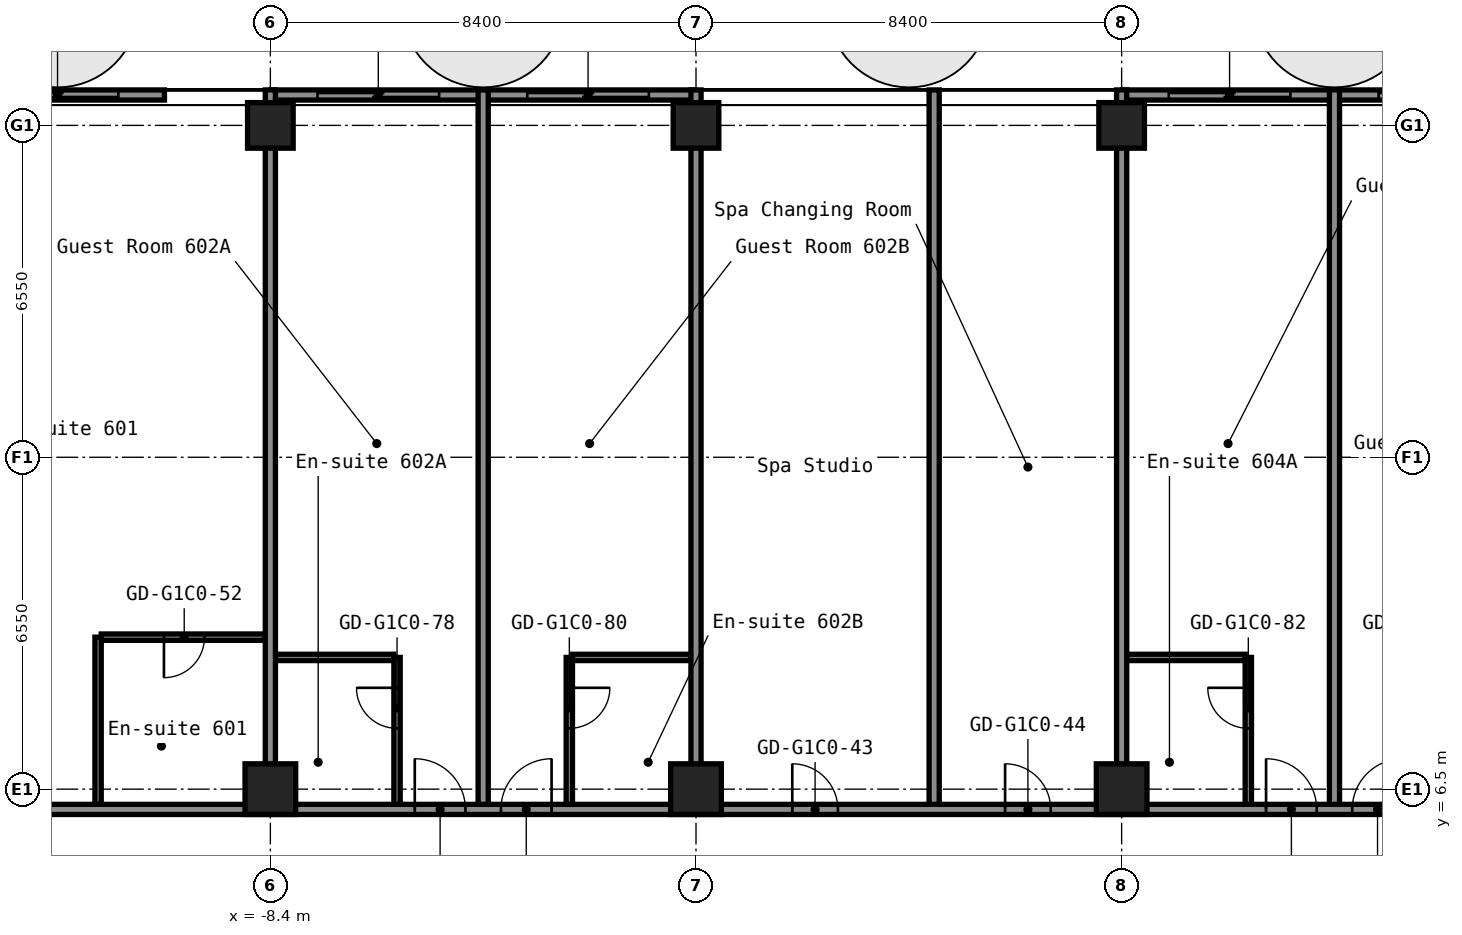
"""IFC4 building model, lengths in metres.
Left out: names, types, materials, properties, quantities, classifications, styles, units other than length and angle.
Written with IfcOpenShell. Run it as: python <this file> out.ifc"""

import sys

from ifc_helpers import new_model, si_unit, direction, frame, frame_2d, origin, origin_2d, place, context, subcontext, project, spatial, rectangle, hollow_rectangle, extrude, element, fill, save


model = new_model("IFC4")
c1 = context("Model", 3, precision=1e-05, world=origin(), true_north=direction((0.0, 1.0)))
c2 = subcontext(c1, "Body", "Model", "MODEL_VIEW")
j1 = project(units=[si_unit("LENGTHUNIT", "METRE"), si_unit("PLANEANGLEUNIT", "RADIAN")], contexts=[c1])
p1 = place(None, origin())
s1 = spatial("IfcSite", under=j1, at=p1, CompositionType="ELEMENT")
p2 = place(p1, origin())
s2 = spatial("IfcBuilding", under=s1, at=p2, CompositionType="ELEMENT")
p3 = place(p2, frame((0.0, 0.0, 26.2)))
s3 = spatial("IfcBuildingStorey", under=s2, at=p3, CompositionType="ELEMENT", Elevation=26.2)
p4 = place(p3, frame((-8.4, 6.5, 0.0), z_axis=(0.0, 0.0, 1.0), x_axis=(1.0, 0.0, 0.0)))
e1 = element("IfcColumn", 1, at=p4, inside=s3, PredefinedType="COLUMN", context=c2, shape_type="SweptSolid", body=[
    extrude(hollow_rectangle(XDim=1.0, YDim=1.0, WallThickness=0.04, at=origin_2d()), origin(), (0.0, 0.0, 1.0), 2.8),
])
p5 = place(p3, frame((-8.4, 19.6, 0.0), z_axis=(0.0, 0.0, 1.0), x_axis=(1.0, 0.0, 0.0)))
e2 = element("IfcColumn", 2, at=p5, inside=s3, PredefinedType="COLUMN", context=c2, shape_type="SweptSolid", body=[
    extrude(hollow_rectangle(XDim=0.9, YDim=0.9, WallThickness=0.036, at=origin_2d()), origin(), (0.0, 0.0, 1.0), 2.8),
])
p6 = place(p3, frame((0.0, 6.5, 0.0), z_axis=(0.0, 0.0, 1.0), x_axis=(1.0, 0.0, 0.0)))
e3 = element("IfcColumn", 3, at=p6, inside=s3, PredefinedType="COLUMN", context=c2, shape_type="SweptSolid", body=[
    extrude(hollow_rectangle(XDim=1.0, YDim=1.0, WallThickness=0.04, at=origin_2d()), origin(), (0.0, 0.0, 1.0), 2.8),
])
p7 = place(p3, frame((0.0, 19.6, 0.0), z_axis=(0.0, 0.0, 1.0), x_axis=(1.0, 0.0, 0.0)))
e4 = element("IfcColumn", 4, at=p7, inside=s3, PredefinedType="COLUMN", context=c2, shape_type="SweptSolid", body=[
    extrude(hollow_rectangle(XDim=0.9, YDim=0.9, WallThickness=0.036, at=origin_2d()), origin(), (0.0, 0.0, 1.0), 2.8),
])
p8 = place(p3, frame((8.4, 6.5, 0.0), z_axis=(0.0, 0.0, 1.0), x_axis=(1.0, 0.0, 0.0)))
e5 = element("IfcColumn", 5, at=p8, inside=s3, PredefinedType="COLUMN", context=c2, shape_type="SweptSolid", body=[
    extrude(hollow_rectangle(XDim=1.0, YDim=1.0, WallThickness=0.04, at=origin_2d()), origin(), (0.0, 0.0, 1.0), 2.8),
])
p9 = place(p3, frame((8.4, 19.6, 0.0), z_axis=(0.0, 0.0, 1.0), x_axis=(1.0, 0.0, 0.0)))
e6 = element("IfcColumn", 6, at=p9, inside=s3, PredefinedType="COLUMN", context=c2, shape_type="SweptSolid", body=[
    extrude(hollow_rectangle(XDim=0.9, YDim=0.9, WallThickness=0.036, at=origin_2d()), origin(), (0.0, 0.0, 1.0), 2.8),
])
p10 = place(p3, frame((-16.8, 6.1, 0.0), z_axis=(0.0, 0.0, 1.0), x_axis=(1.0, 0.0, 0.0)))
e7 = element("IfcWall", 7, at=p10, inside=s3, PredefinedType="PARTITIONING", context=c2, shape_type="SweptSolid", body=[
    extrude(rectangle(XDim=33.6, YDim=0.2, at=frame_2d((16.8, 0.0))), origin(), (0.0, 0.0, 1.0), 2.8),
])
p11 = place(p10, frame((2.0, 0.0, 0.0)))
e8 = element("IfcOpeningElement", 8, at=p11, cuts=e7, PredefinedType="OPENING", context=c2, shape_type="SweptSolid", body=[
    extrude(rectangle(XDim=1.0, YDim=2.1, at=frame_2d((0.5, 1.05))), frame((0.0, 0.11, 0.0), z_axis=(0.0, -1.0, 0.0), x_axis=(1.0, 0.0, 0.0)), (0.0, 0.0, 1.0), 0.22),
])
p12 = place(p10, frame((11.25, 0.0, 0.0)))
e9 = element("IfcOpeningElement", 9, at=p12, cuts=e7, PredefinedType="OPENING", context=c2, shape_type="SweptSolid", body=[
    extrude(rectangle(XDim=1.0, YDim=2.1, at=frame_2d((0.5, 1.05))), frame((0.0, 0.11, 0.0), z_axis=(0.0, -1.0, 0.0), x_axis=(1.0, 0.0, 0.0)), (0.0, 0.0, 1.0), 0.22),
])
p13 = place(p10, frame((12.95, 0.0, 0.0)))
e10 = element("IfcOpeningElement", 10, at=p13, cuts=e7, PredefinedType="OPENING", context=c2, shape_type="SweptSolid", body=[
    extrude(rectangle(XDim=1.0, YDim=2.1, at=frame_2d((0.5, 1.05))), frame((0.0, 0.11, 0.0), z_axis=(0.0, -1.0, 0.0), x_axis=(1.0, 0.0, 0.0)), (0.0, 0.0, 1.0), 0.22),
])
p14 = place(p10, frame((18.7, 0.0, 0.0)))
e11 = element("IfcOpeningElement", 11, at=p14, cuts=e7, PredefinedType="OPENING", context=c2, shape_type="SweptSolid", body=[
    extrude(rectangle(XDim=0.9, YDim=2.1, at=frame_2d((0.45, 1.05))), frame((0.0, 0.11, 0.0), z_axis=(0.0, -1.0, 0.0), x_axis=(1.0, 0.0, 0.0)), (0.0, 0.0, 1.0), 0.22),
])
p15 = place(p10, frame((22.9, 0.0, 0.0)))
e12 = element("IfcOpeningElement", 12, at=p15, cuts=e7, PredefinedType="OPENING", context=c2, shape_type="SweptSolid", body=[
    extrude(rectangle(XDim=0.9, YDim=2.1, at=frame_2d((0.45, 1.05))), frame((0.0, 0.11, 0.0), z_axis=(0.0, -1.0, 0.0), x_axis=(1.0, 0.0, 0.0)), (0.0, 0.0, 1.0), 0.22),
])
p16 = place(p10, frame((28.05, 0.0, 0.0)))
e13 = element("IfcOpeningElement", 13, at=p16, cuts=e7, PredefinedType="OPENING", context=c2, shape_type="SweptSolid", body=[
    extrude(rectangle(XDim=1.0, YDim=2.1, at=frame_2d((0.5, 1.05))), frame((0.0, 0.11, 0.0), z_axis=(0.0, -1.0, 0.0), x_axis=(1.0, 0.0, 0.0)), (0.0, 0.0, 1.0), 0.22),
])
p17 = place(p10, frame((29.75, 0.0, 0.0)))
e14 = element("IfcOpeningElement", 14, at=p17, cuts=e7, PredefinedType="OPENING", context=c2, shape_type="SweptSolid", body=[
    extrude(rectangle(XDim=1.0, YDim=2.1, at=frame_2d((0.5, 1.05))), frame((0.0, 0.11, 0.0), z_axis=(0.0, -1.0, 0.0), x_axis=(1.0, 0.0, 0.0)), (0.0, 0.0, 1.0), 0.22),
])
p18 = place(p3, frame((-8.3, 9.1, 0.0), z_axis=(0.0, 0.0, 1.0), x_axis=(1.0, 0.0, 0.0)))
e15 = element("IfcWall", 15, at=p18, inside=s3, PredefinedType="PARTITIONING", context=c2, shape_type="SweptSolid", body=[
    extrude(rectangle(XDim=2.338, YDim=0.125, at=frame_2d((1.169, 0.0))), origin(), (0.0, 0.0, 1.0), 2.8),
])
for number, where, z_axis, x_axis in (
    (16, (-2.438, 9.1, 0.0), (0.0, 0.0, 1.0), (1.0, 0.0, 0.0)),
    (17, (8.5, 9.1, 0.0), (0.0, 0.0, 1.0), (1.0, 0.0, 0.0)),
):
    element("IfcWall", number, at=place(p3, frame(where, z_axis=z_axis, x_axis=x_axis)), inside=s3, PredefinedType="PARTITIONING", context=c2, shape_type="SweptSolid", body=[
        extrude(rectangle(XDim=2.337, YDim=0.125, at=frame_2d((1.169, 0.0))), origin(), (0.0, 0.0, 1.0), 2.8),
    ])
p19 = place(p3, frame((-11.738, 9.5, 0.0), z_axis=(0.0, 0.0, 1.0), x_axis=(1.0, 0.0, 0.0)))
e18 = element("IfcWall", 18, at=p19, inside=s3, PredefinedType="PARTITIONING", context=c2, shape_type="SweptSolid", body=[
    extrude(rectangle(XDim=3.238, YDim=0.125, at=frame_2d((1.619, 0.0))), origin(), (0.0, 0.0, 1.0), 2.8),
])
p20 = place(p19, frame((1.238, 0.0, 0.0)))
e19 = element("IfcOpeningElement", 19, at=p20, cuts=e18, PredefinedType="OPENING", context=c2, shape_type="SweptSolid", body=[
    extrude(rectangle(XDim=0.8, YDim=2.1, at=frame_2d((0.4, 1.05))), frame((0.0, 0.073, 0.0), z_axis=(0.0, -1.0, 0.0), x_axis=(1.0, 0.0, 0.0)), (0.0, 0.0, 1.0), 0.145),
])
p21 = place(p3, frame((-11.8, 6.2, 0.0), z_axis=(0.0, 0.0, 1.0), x_axis=(0.0, 1.0, 0.0)))
e20 = element("IfcWall", 20, at=p21, inside=s3, PredefinedType="PARTITIONING", context=c2, shape_type="SweptSolid", body=[
    extrude(rectangle(XDim=3.3, YDim=0.125, at=frame_2d((1.65, 0.0))), origin(), (0.0, 0.0, 1.0), 2.8),
])
p22 = place(p3, frame((-8.4, 6.99, 0.0), z_axis=(0.0, 0.0, 1.0), x_axis=(0.0, 1.0, 0.0)))
e21 = element("IfcWall", 21, at=p22, inside=s3, PredefinedType="PARTITIONING", context=c2, shape_type="SweptSolid", body=[
    extrude(rectangle(XDim=13.31, YDim=0.2, at=frame_2d((6.655, 0.0))), origin(), (0.0, 0.0, 1.0), 2.8),
])
p23 = place(p3, frame((-5.9, 6.2, 0.0), z_axis=(0.0, 0.0, 1.0), x_axis=(0.0, 1.0, 0.0)))
e22 = element("IfcWall", 22, at=p23, inside=s3, PredefinedType="PARTITIONING", context=c2, shape_type="SweptSolid", body=[
    extrude(rectangle(XDim=2.9, YDim=0.125, at=frame_2d((1.45, 0.0))), origin(), (0.0, 0.0, 1.0), 2.8),
])
p24 = place(p23, frame((1.5, 0.0, 0.0)))
e23 = element("IfcOpeningElement", 23, at=p24, cuts=e22, PredefinedType="OPENING", context=c2, shape_type="SweptSolid", body=[
    extrude(rectangle(XDim=0.8, YDim=2.1, at=frame_2d((0.4, 1.05))), frame((0.0, 0.073, 0.0), z_axis=(0.0, -1.0, 0.0), x_axis=(1.0, 0.0, 0.0)), (0.0, 0.0, 1.0), 0.145),
])
p25 = place(p3, frame((-4.2, 6.2, 0.0), z_axis=(0.0, 0.0, 1.0), x_axis=(0.0, 1.0, 0.0)))
e24 = element("IfcWall", 24, at=p25, inside=s3, PredefinedType="PARTITIONING", context=c2, shape_type="SweptSolid", body=[
    extrude(rectangle(XDim=14.1, YDim=0.2, at=frame_2d((7.05, 0.0))), origin(), (0.0, 0.0, 1.0), 2.8),
])
p26 = place(p3, frame((-2.5, 6.2, 0.0), z_axis=(0.0, 0.0, 1.0), x_axis=(0.0, 1.0, 0.0)))
e25 = element("IfcWall", 25, at=p26, inside=s3, PredefinedType="PARTITIONING", context=c2, shape_type="SweptSolid", body=[
    extrude(rectangle(XDim=2.9, YDim=0.125, at=frame_2d((1.45, 0.0))), origin(), (0.0, 0.0, 1.0), 2.8),
])
p27 = place(p26, frame((1.5, 0.0, 0.0)))
e26 = element("IfcOpeningElement", 26, at=p27, cuts=e25, PredefinedType="OPENING", context=c2, shape_type="SweptSolid", body=[
    extrude(rectangle(XDim=0.8, YDim=2.1, at=frame_2d((0.4, 1.05))), frame((0.0, 0.073, 0.0), z_axis=(0.0, -1.0, 0.0), x_axis=(1.0, 0.0, 0.0)), (0.0, 0.0, 1.0), 0.145),
])
p28 = place(p3, frame((0.0, 6.99, 0.0), z_axis=(0.0, 0.0, 1.0), x_axis=(0.0, 1.0, 0.0)))
e27 = element("IfcWall", 27, at=p28, inside=s3, PredefinedType="PARTITIONING", context=c2, shape_type="SweptSolid", body=[
    extrude(rectangle(XDim=13.31, YDim=0.2, at=frame_2d((6.655, 0.0))), origin(), (0.0, 0.0, 1.0), 2.8),
])
p29 = place(p3, frame((4.7, 6.2, 0.0), z_axis=(0.0, 0.0, 1.0), x_axis=(0.0, 1.0, 0.0)))
e28 = element("IfcWall", 28, at=p29, inside=s3, PredefinedType="PARTITIONING", context=c2, shape_type="SweptSolid", body=[
    extrude(rectangle(XDim=14.1, YDim=0.2, at=frame_2d((7.05, 0.0))), origin(), (0.0, 0.0, 1.0), 2.8),
])
p30 = place(p3, frame((8.4, 6.99, 0.0), z_axis=(0.0, 0.0, 1.0), x_axis=(0.0, 1.0, 0.0)))
e29 = element("IfcWall", 29, at=p30, inside=s3, PredefinedType="PARTITIONING", context=c2, shape_type="SweptSolid", body=[
    extrude(rectangle(XDim=13.31, YDim=0.2, at=frame_2d((6.655, 0.0))), origin(), (0.0, 0.0, 1.0), 2.8),
])
p31 = place(p3, frame((10.9, 6.2, 0.0), z_axis=(0.0, 0.0, 1.0), x_axis=(0.0, 1.0, 0.0)))
e30 = element("IfcWall", 30, at=p31, inside=s3, PredefinedType="PARTITIONING", context=c2, shape_type="SweptSolid", body=[
    extrude(rectangle(XDim=2.9, YDim=0.125, at=frame_2d((1.45, 0.0))), origin(), (0.0, 0.0, 1.0), 2.8),
])
p32 = place(p31, frame((1.5, 0.0, 0.0)))
e31 = element("IfcOpeningElement", 31, at=p32, cuts=e30, PredefinedType="OPENING", context=c2, shape_type="SweptSolid", body=[
    extrude(rectangle(XDim=0.8, YDim=2.1, at=frame_2d((0.4, 1.05))), frame((0.0, 0.073, 0.0), z_axis=(0.0, -1.0, 0.0), x_axis=(1.0, 0.0, 0.0)), (0.0, 0.0, 1.0), 0.145),
])
p33 = place(p3, frame((12.6, 6.2, 0.0), z_axis=(0.0, 0.0, 1.0), x_axis=(0.0, 1.0, 0.0)))
e32 = element("IfcWall", 32, at=p33, inside=s3, PredefinedType="PARTITIONING", context=c2, shape_type="SweptSolid", body=[
    extrude(rectangle(XDim=14.1, YDim=0.2, at=frame_2d((7.05, 0.0))), origin(), (0.0, 0.0, 1.0), 2.8),
])
p34 = place(p3, frame((16.78, 20.2, 0.0), z_axis=(0.0, 0.0, 1.0), x_axis=(-1.0, 0.0, 0.0)))
p35 = place(p34, frame((0.91, 0.0, 0.0)))
p36 = place(p35, frame((2.4, 0.0, 0.0), z_axis=(0.0, 0.0, 1.0), x_axis=(-1.0, 0.0, 0.0)))
e33 = element("IfcDoor", 33, at=p36, inside=s3, OperationType="SLIDING_TO_LEFT", PredefinedType="DOOR", context=c2, shape_type="SweptSolid", body=[
    extrude(rectangle(XDim=2.4, YDim=2.2, at=frame_2d((1.2, 1.1))), frame((0.0, 0.025, 0.0), z_axis=(0.0, -1.0, 0.0), x_axis=(1.0, 0.0, 0.0)), (0.0, 0.0, 1.0), 0.05),
])
p37 = place(p3, frame((12.64, 20.2, 0.0), z_axis=(0.0, 0.0, 1.0), x_axis=(-1.0, 0.0, 0.0)))
p38 = place(p37, frame((0.91, 0.0, 0.0)))
p39 = place(p38, frame((2.4, 0.0, 0.0), z_axis=(0.0, 0.0, 1.0), x_axis=(-1.0, 0.0, 0.0)))
e34 = element("IfcDoor", 34, at=p39, inside=s3, OperationType="SLIDING_TO_LEFT", PredefinedType="DOOR", context=c2, shape_type="SweptSolid", body=[
    extrude(rectangle(XDim=2.4, YDim=2.2, at=frame_2d((1.2, 1.1))), frame((0.0, 0.025, 0.0), z_axis=(0.0, -1.0, 0.0), x_axis=(1.0, 0.0, 0.0)), (0.0, 0.0, 1.0), 0.05),
])
p40 = place(p3, frame((-0.02, 20.2, 0.0), z_axis=(0.0, 0.0, 1.0), x_axis=(-1.0, 0.0, 0.0)))
p41 = place(p40, frame((0.91, 0.0, 0.0)))
p42 = place(p41, frame((2.4, 0.0, 0.0), z_axis=(0.0, 0.0, 1.0), x_axis=(-1.0, 0.0, 0.0)))
e35 = element("IfcDoor", 35, at=p42, inside=s3, OperationType="SLIDING_TO_LEFT", PredefinedType="DOOR", context=c2, shape_type="SweptSolid", body=[
    extrude(rectangle(XDim=2.4, YDim=2.2, at=frame_2d((1.2, 1.1))), frame((0.0, 0.025, 0.0), z_axis=(0.0, -1.0, 0.0), x_axis=(1.0, 0.0, 0.0)), (0.0, 0.0, 1.0), 0.05),
])
p43 = place(p3, frame((-4.16, 20.2, 0.0), z_axis=(0.0, 0.0, 1.0), x_axis=(-1.0, 0.0, 0.0)))
p44 = place(p43, frame((0.91, 0.0, 0.0)))
p45 = place(p44, frame((2.4, 0.0, 0.0), z_axis=(0.0, 0.0, 1.0), x_axis=(-1.0, 0.0, 0.0)))
e36 = element("IfcDoor", 36, at=p45, inside=s3, OperationType="SLIDING_TO_LEFT", PredefinedType="DOOR", context=c2, shape_type="SweptSolid", body=[
    extrude(rectangle(XDim=2.4, YDim=2.2, at=frame_2d((1.2, 1.1))), frame((0.0, 0.025, 0.0), z_axis=(0.0, -1.0, 0.0), x_axis=(1.0, 0.0, 0.0)), (0.0, 0.0, 1.0), 0.05),
])
p46 = place(p3, frame((-10.49, 20.2, 0.0), z_axis=(0.0, 0.0, 1.0), x_axis=(-1.0, 0.0, 0.0)))
p47 = place(p46, frame((0.91, 0.0, 0.0)))
p48 = place(p47, frame((2.4, 0.0, 0.0), z_axis=(0.0, 0.0, 1.0), x_axis=(-1.0, 0.0, 0.0)))
e37 = element("IfcDoor", 37, at=p48, inside=s3, OperationType="SLIDING_TO_LEFT", PredefinedType="DOOR", context=c2, shape_type="SweptSolid", body=[
    extrude(rectangle(XDim=2.4, YDim=2.2, at=frame_2d((1.2, 1.1))), frame((0.0, 0.025, 0.0), z_axis=(0.0, -1.0, 0.0), x_axis=(1.0, 0.0, 0.0)), (0.0, 0.0, 1.0), 0.05),
])
p49 = place(p12, origin())
e38 = element("IfcDoor", 38, at=p49, inside=s3, OperationType="SINGLE_SWING_RIGHT", PredefinedType="DOOR", context=c2, shape_type="SweptSolid", body=[
    extrude(rectangle(XDim=1.0, YDim=2.1, at=frame_2d((0.5, 1.05))), frame((0.0, 0.025, 0.0), z_axis=(0.0, -1.0, 0.0), x_axis=(1.0, 0.0, 0.0)), (0.0, 0.0, 1.0), 0.05),
])
fill(e9, e38)
p50 = place(p13, origin())
e39 = element("IfcDoor", 39, at=p50, inside=s3, OperationType="SINGLE_SWING_LEFT", PredefinedType="DOOR", context=c2, shape_type="SweptSolid", body=[
    extrude(rectangle(XDim=1.0, YDim=2.1, at=frame_2d((0.5, 1.05))), frame((0.0, 0.025, 0.0), z_axis=(0.0, -1.0, 0.0), x_axis=(1.0, 0.0, 0.0)), (0.0, 0.0, 1.0), 0.05),
])
fill(e10, e39)
p51 = place(p14, origin())
e40 = element("IfcDoor", 40, at=p51, inside=s3, OperationType="SINGLE_SWING_RIGHT", PredefinedType="DOOR", context=c2, shape_type="SweptSolid", body=[
    extrude(rectangle(XDim=0.9, YDim=2.1, at=frame_2d((0.45, 1.05))), frame((0.0, 0.025, 0.0), z_axis=(0.0, -1.0, 0.0), x_axis=(1.0, 0.0, 0.0)), (0.0, 0.0, 1.0), 0.05),
])
fill(e11, e40)
p52 = place(p15, origin())
e41 = element("IfcDoor", 41, at=p52, inside=s3, OperationType="SINGLE_SWING_RIGHT", PredefinedType="DOOR", context=c2, shape_type="SweptSolid", body=[
    extrude(rectangle(XDim=0.9, YDim=2.1, at=frame_2d((0.45, 1.05))), frame((0.0, 0.025, 0.0), z_axis=(0.0, -1.0, 0.0), x_axis=(1.0, 0.0, 0.0)), (0.0, 0.0, 1.0), 0.05),
])
fill(e12, e41)
p53 = place(p16, origin())
e42 = element("IfcDoor", 42, at=p53, inside=s3, OperationType="SINGLE_SWING_RIGHT", PredefinedType="DOOR", context=c2, shape_type="SweptSolid", body=[
    extrude(rectangle(XDim=1.0, YDim=2.1, at=frame_2d((0.5, 1.05))), frame((0.0, 0.025, 0.0), z_axis=(0.0, -1.0, 0.0), x_axis=(1.0, 0.0, 0.0)), (0.0, 0.0, 1.0), 0.05),
])
fill(e13, e42)
p54 = place(p17, origin())
e43 = element("IfcDoor", 43, at=p54, inside=s3, OperationType="SINGLE_SWING_LEFT", PredefinedType="DOOR", context=c2, shape_type="SweptSolid", body=[
    extrude(rectangle(XDim=1.0, YDim=2.1, at=frame_2d((0.5, 1.05))), frame((0.0, 0.025, 0.0), z_axis=(0.0, -1.0, 0.0), x_axis=(1.0, 0.0, 0.0)), (0.0, 0.0, 1.0), 0.05),
])
fill(e14, e43)
p55 = place(p20, origin())
e44 = element("IfcDoor", 44, at=p55, inside=s3, OperationType="SINGLE_SWING_LEFT", PredefinedType="DOOR", context=c2, shape_type="SweptSolid", body=[
    extrude(rectangle(XDim=0.8, YDim=2.1, at=frame_2d((0.4, 1.05))), frame((0.0, 0.025, 0.0), z_axis=(0.0, -1.0, 0.0), x_axis=(1.0, 0.0, 0.0)), (0.0, 0.0, 1.0), 0.05),
])
fill(e19, e44)
p56 = place(p24, origin())
e45 = element("IfcDoor", 45, at=p56, inside=s3, OperationType="SINGLE_SWING_LEFT", PredefinedType="DOOR", context=c2, shape_type="SweptSolid", body=[
    extrude(rectangle(XDim=0.8, YDim=2.1, at=frame_2d((0.4, 1.05))), frame((0.0, 0.025, 0.0), z_axis=(0.0, -1.0, 0.0), x_axis=(1.0, 0.0, 0.0)), (0.0, 0.0, 1.0), 0.05),
])
fill(e23, e45)
p57 = place(p27, origin())
e46 = element("IfcDoor", 46, at=p57, inside=s3, OperationType="SINGLE_SWING_RIGHT", PredefinedType="DOOR", context=c2, shape_type="SweptSolid", body=[
    extrude(rectangle(XDim=0.8, YDim=2.1, at=frame_2d((0.4, 1.05))), frame((0.0, 0.025, 0.0), z_axis=(0.0, -1.0, 0.0), x_axis=(1.0, 0.0, 0.0)), (0.0, 0.0, 1.0), 0.05),
])
fill(e26, e46)
p58 = place(p32, origin())
e47 = element("IfcDoor", 47, at=p58, inside=s3, OperationType="SINGLE_SWING_LEFT", PredefinedType="DOOR", context=c2, shape_type="SweptSolid", body=[
    extrude(rectangle(XDim=0.8, YDim=2.1, at=frame_2d((0.4, 1.05))), frame((0.0, 0.025, 0.0), z_axis=(0.0, -1.0, 0.0), x_axis=(1.0, 0.0, 0.0)), (0.0, 0.0, 1.0), 0.05),
])
fill(e31, e47)
save(model, sys.argv[1])
